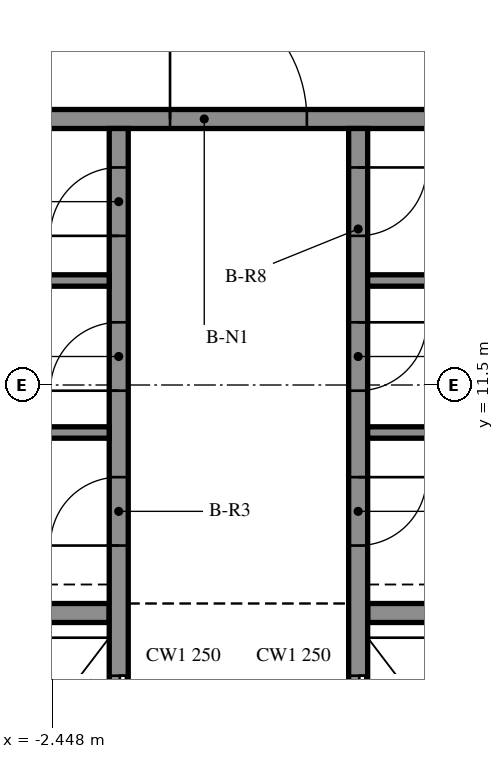
"""IFC4 building model, lengths in metres.
Left out: names, types, materials, properties, quantities, classifications, styles, units other than length and angle.
Written with IfcOpenShell. Run it as: python <this file> out.ifc"""

import sys

from ifc_helpers import new_model, si_unit, direction, frame, frame_2d, origin, place, context, subcontext, project, spatial, rectangle, extrude, element, fill, save


model = new_model("IFC4")
c1 = context("Model", 3, precision=1e-05, world=origin(), true_north=direction((0.0, 1.0)))
c2 = subcontext(c1, "Body", "Model", "MODEL_VIEW")
j1 = project(units=[si_unit("LENGTHUNIT", "METRE"), si_unit("PLANEANGLEUNIT", "RADIAN")], contexts=[c1])
p1 = place(None, origin())
s1 = spatial("IfcSite", under=j1, at=p1, CompositionType="ELEMENT")
p2 = place(p1, origin())
s2 = spatial("IfcBuilding", under=s1, at=p2, CompositionType="ELEMENT")
p3 = place(p2, frame((0.0, 0.0, 154.8)))
s3 = spatial("IfcBuildingStorey", under=s2, at=p3, CompositionType="ELEMENT", Elevation=154.8)
p4 = place(p3, frame((-4.55, 15.0, 0.0), z_axis=(0.0, 0.0, 1.0), x_axis=(1.0, 0.0, 0.0)))
e1 = element("IfcWall", 1, at=p4, inside=s3, PredefinedType="SOLIDWALL", context=c2, shape_type="SweptSolid", body=[
    extrude(rectangle(XDim=9.1, YDim=0.25, at=frame_2d((4.55, 0.0))), origin(), (0.0, 0.0, 1.0), 4.06),
])
p5 = place(p4, frame((3.65, 0.0, 0.0)))
e2 = element("IfcOpeningElement", 2, at=p5, cuts=e1, PredefinedType="OPENING", context=c2, shape_type="SweptSolid", body=[
    extrude(rectangle(XDim=1.8, YDim=2.1, at=frame_2d((0.9, 1.05))), frame((0.0, 0.135, 0.0), z_axis=(0.0, -1.0, 0.0), x_axis=(1.0, 0.0, 0.0)), (0.0, 0.0, 1.0), 0.27),
])
p6 = place(p3, frame((-1.575, -8.875, 0.0), z_axis=(0.0, 0.0, 1.0), x_axis=(0.0, 1.0, 0.0)))
e3 = element("IfcWall", 3, at=p6, inside=s3, PredefinedType="SOLIDWALL", context=c2, shape_type="SweptSolid", body=[
    extrude(rectangle(XDim=23.75, YDim=0.25, at=frame_2d((11.875, 0.0))), origin(), (0.0, 0.0, 1.0), 4.06),
])
p7 = place(p6, frame((7.2, 0.0, 0.0)))
e4 = element("IfcOpeningElement", 4, at=p7, cuts=e3, PredefinedType="OPENING", context=c2, shape_type="SweptSolid", body=[
    extrude(rectangle(XDim=1.1, YDim=2.1, at=frame_2d((0.55, 1.05))), frame((0.0, 0.135, 0.0), z_axis=(0.0, -1.0, 0.0), x_axis=(1.0, 0.0, 0.0)), (0.0, 0.0, 1.0), 0.27),
])
p8 = place(p6, frame((9.95, 0.0, 0.0)))
e5 = element("IfcOpeningElement", 5, at=p8, cuts=e3, PredefinedType="OPENING", context=c2, shape_type="SweptSolid", body=[
    extrude(rectangle(XDim=1.1, YDim=2.1, at=frame_2d((0.55, 1.05))), frame((0.0, 0.135, 0.0), z_axis=(0.0, -1.0, 0.0), x_axis=(1.0, 0.0, 0.0)), (0.0, 0.0, 1.0), 0.27),
])
p9 = place(p6, frame((12.7, 0.0, 0.0)))
e6 = element("IfcOpeningElement", 6, at=p9, cuts=e3, PredefinedType="OPENING", context=c2, shape_type="SweptSolid", body=[
    extrude(rectangle(XDim=1.1, YDim=2.1, at=frame_2d((0.55, 1.05))), frame((0.0, 0.135, 0.0), z_axis=(0.0, -1.0, 0.0), x_axis=(1.0, 0.0, 0.0)), (0.0, 0.0, 1.0), 0.27),
])
p10 = place(p6, frame((15.45, 0.0, 0.0)))
e7 = element("IfcOpeningElement", 7, at=p10, cuts=e3, PredefinedType="OPENING", context=c2, shape_type="SweptSolid", body=[
    extrude(rectangle(XDim=1.1, YDim=2.1, at=frame_2d((0.55, 1.05))), frame((0.0, 0.135, 0.0), z_axis=(0.0, -1.0, 0.0), x_axis=(1.0, 0.0, 0.0)), (0.0, 0.0, 1.0), 0.27),
])
p11 = place(p6, frame((1.012, 0.0, 0.0)))
e8 = element("IfcOpeningElement", 8, at=p11, cuts=e3, PredefinedType="OPENING", context=c2, shape_type="SweptSolid", body=[
    extrude(rectangle(XDim=0.9, YDim=2.1, at=frame_2d((0.45, 1.05))), frame((0.0, 0.135, 0.0), z_axis=(0.0, -1.0, 0.0), x_axis=(1.0, 0.0, 0.0)), (0.0, 0.0, 1.0), 0.27),
])
p12 = place(p6, frame((4.087, 0.0, 0.0)))
e9 = element("IfcOpeningElement", 9, at=p12, cuts=e3, PredefinedType="OPENING", context=c2, shape_type="SweptSolid", body=[
    extrude(rectangle(XDim=0.9, YDim=2.1, at=frame_2d((0.45, 1.05))), frame((0.0, 0.135, 0.0), z_axis=(0.0, -1.0, 0.0), x_axis=(1.0, 0.0, 0.0)), (0.0, 0.0, 1.0), 0.27),
])
p13 = place(p6, frame((18.262, 0.0, 0.0)))
e10 = element("IfcOpeningElement", 10, at=p13, cuts=e3, PredefinedType="OPENING", context=c2, shape_type="SweptSolid", body=[
    extrude(rectangle(XDim=0.9, YDim=2.1, at=frame_2d((0.45, 1.05))), frame((0.0, 0.135, 0.0), z_axis=(0.0, -1.0, 0.0), x_axis=(1.0, 0.0, 0.0)), (0.0, 0.0, 1.0), 0.27),
])
p14 = place(p6, frame((20.3, 0.0, 0.0)))
e11 = element("IfcOpeningElement", 11, at=p14, cuts=e3, PredefinedType="OPENING", context=c2, shape_type="SweptSolid", body=[
    extrude(rectangle(XDim=0.9, YDim=2.1, at=frame_2d((0.45, 1.05))), frame((0.0, 0.135, 0.0), z_axis=(0.0, -1.0, 0.0), x_axis=(1.0, 0.0, 0.0)), (0.0, 0.0, 1.0), 0.27),
])
p15 = place(p6, frame((22.337, 0.0, 0.0)))
e12 = element("IfcOpeningElement", 12, at=p15, cuts=e3, PredefinedType="OPENING", context=c2, shape_type="SweptSolid", body=[
    extrude(rectangle(XDim=0.9, YDim=2.1, at=frame_2d((0.45, 1.05))), frame((0.0, 0.135, 0.0), z_axis=(0.0, -1.0, 0.0), x_axis=(1.0, 0.0, 0.0)), (0.0, 0.0, 1.0), 0.27),
])
p16 = place(p3, frame((1.575, 14.875, 0.0), z_axis=(0.0, 0.0, 1.0), x_axis=(0.0, -1.0, 0.0)))
e13 = element("IfcWall", 13, at=p16, inside=s3, PredefinedType="SOLIDWALL", context=c2, shape_type="SweptSolid", body=[
    extrude(rectangle(XDim=17.5, YDim=0.25, at=frame_2d((8.75, 0.0))), origin(), (0.0, 0.0, 1.0), 4.06),
])
p17 = place(p16, frame((15.45, 0.0, 0.0)))
e14 = element("IfcOpeningElement", 14, at=p17, cuts=e13, PredefinedType="OPENING", context=c2, shape_type="SweptSolid", body=[
    extrude(rectangle(XDim=1.1, YDim=2.1, at=frame_2d((0.55, 1.05))), frame((0.0, 0.135, 0.0), z_axis=(0.0, -1.0, 0.0), x_axis=(1.0, 0.0, 0.0)), (0.0, 0.0, 1.0), 0.27),
])
p18 = place(p16, frame((12.7, 0.0, 0.0)))
e15 = element("IfcOpeningElement", 15, at=p18, cuts=e13, PredefinedType="OPENING", context=c2, shape_type="SweptSolid", body=[
    extrude(rectangle(XDim=1.1, YDim=2.1, at=frame_2d((0.55, 1.05))), frame((0.0, 0.135, 0.0), z_axis=(0.0, -1.0, 0.0), x_axis=(1.0, 0.0, 0.0)), (0.0, 0.0, 1.0), 0.27),
])
p19 = place(p16, frame((9.95, 0.0, 0.0)))
e16 = element("IfcOpeningElement", 16, at=p19, cuts=e13, PredefinedType="OPENING", context=c2, shape_type="SweptSolid", body=[
    extrude(rectangle(XDim=1.1, YDim=2.1, at=frame_2d((0.55, 1.05))), frame((0.0, 0.135, 0.0), z_axis=(0.0, -1.0, 0.0), x_axis=(1.0, 0.0, 0.0)), (0.0, 0.0, 1.0), 0.27),
])
p20 = place(p16, frame((7.2, 0.0, 0.0)))
e17 = element("IfcOpeningElement", 17, at=p20, cuts=e13, PredefinedType="OPENING", context=c2, shape_type="SweptSolid", body=[
    extrude(rectangle(XDim=1.1, YDim=2.1, at=frame_2d((0.55, 1.05))), frame((0.0, 0.135, 0.0), z_axis=(0.0, -1.0, 0.0), x_axis=(1.0, 0.0, 0.0)), (0.0, 0.0, 1.0), 0.27),
])
p21 = place(p16, frame((4.587, 0.0, 0.0)))
e18 = element("IfcOpeningElement", 18, at=p21, cuts=e13, PredefinedType="OPENING", context=c2, shape_type="SweptSolid", body=[
    extrude(rectangle(XDim=0.9, YDim=2.1, at=frame_2d((0.45, 1.05))), frame((0.0, 0.135, 0.0), z_axis=(0.0, -1.0, 0.0), x_axis=(1.0, 0.0, 0.0)), (0.0, 0.0, 1.0), 0.27),
])
p22 = place(p16, frame((2.55, 0.0, 0.0)))
e19 = element("IfcOpeningElement", 19, at=p22, cuts=e13, PredefinedType="OPENING", context=c2, shape_type="SweptSolid", body=[
    extrude(rectangle(XDim=0.9, YDim=2.1, at=frame_2d((0.45, 1.05))), frame((0.0, 0.135, 0.0), z_axis=(0.0, -1.0, 0.0), x_axis=(1.0, 0.0, 0.0)), (0.0, 0.0, 1.0), 0.27),
])
p23 = place(p16, frame((0.512, 0.0, 0.0)))
e20 = element("IfcOpeningElement", 20, at=p23, cuts=e13, PredefinedType="OPENING", context=c2, shape_type="SweptSolid", body=[
    extrude(rectangle(XDim=0.9, YDim=2.1, at=frame_2d((0.45, 1.05))), frame((0.0, 0.135, 0.0), z_axis=(0.0, -1.0, 0.0), x_axis=(1.0, 0.0, 0.0)), (0.0, 0.0, 1.0), 0.27),
])
for number, where, z_axis, x_axis in (
    (21, (-4.55, 8.5, 0.0), (0.0, 0.0, 1.0), (1.0, 0.0, 0.0)),
    (22, (1.7, 8.5, 0.0), (0.0, 0.0, 1.0), (1.0, 0.0, 0.0)),
):
    element("IfcWall", number, at=place(p3, frame(where, z_axis=z_axis, x_axis=x_axis)), inside=s3, PredefinedType="SOLIDWALL", context=c2, shape_type="SweptSolid", body=[
        extrude(rectangle(XDim=2.85, YDim=0.25, at=frame_2d((1.425, 0.0))), origin(), (0.0, 0.0, 1.0), 4.06),
    ])
for number, where, z_axis, x_axis in (
    (23, (-4.55, 10.875, 0.0), (0.0, 0.0, 1.0), (1.0, 0.0, 0.0)),
    (24, (-4.55, 12.875, 0.0), (0.0, 0.0, 1.0), (1.0, 0.0, 0.0)),
    (25, (1.7, 10.875, 0.0), (0.0, 0.0, 1.0), (1.0, 0.0, 0.0)),
    (26, (1.7, 12.875, 0.0), (0.0, 0.0, 1.0), (1.0, 0.0, 0.0)),
):
    element("IfcWall", number, at=place(p3, frame(where, z_axis=z_axis, x_axis=x_axis)), inside=s3, PredefinedType="PARTITIONING", context=c2, shape_type="SweptSolid", body=[
        extrude(rectangle(XDim=2.85, YDim=0.15, at=frame_2d((1.425, 0.0))), origin(), (0.0, 0.0, 1.0), 4.06),
    ])
p24 = place(p5, origin())
e27 = element("IfcDoor", 27, at=p24, inside=s3, OperationType="DOUBLE_DOOR_SINGLE_SWING", PredefinedType="DOOR", context=c2, shape_type="SweptSolid", body=[
    extrude(rectangle(XDim=1.8, YDim=2.1, at=frame_2d((0.9, 1.05))), frame((0.0, 0.025, 0.0), z_axis=(0.0, -1.0, 0.0), x_axis=(1.0, 0.0, 0.0)), (0.0, 0.0, 1.0), 0.05),
])
fill(e2, e27)
p25 = place(p20, origin())
e28 = element("IfcDoor", 28, at=p25, inside=s3, OperationType="DOUBLE_DOOR_SLIDING", PredefinedType="DOOR", context=c2, shape_type="SweptSolid", body=[
    extrude(rectangle(XDim=1.1, YDim=2.1, at=frame_2d((0.55, 1.05))), frame((0.0, 0.025, 0.0), z_axis=(0.0, -1.0, 0.0), x_axis=(1.0, 0.0, 0.0)), (0.0, 0.0, 1.0), 0.05),
])
fill(e17, e28)
p26 = place(p10, origin())
e29 = element("IfcDoor", 29, at=p26, inside=s3, OperationType="DOUBLE_DOOR_SLIDING", PredefinedType="DOOR", context=c2, shape_type="SweptSolid", body=[
    extrude(rectangle(XDim=1.1, YDim=2.1, at=frame_2d((0.55, 1.05))), frame((0.0, 0.025, 0.0), z_axis=(0.0, -1.0, 0.0), x_axis=(1.0, 0.0, 0.0)), (0.0, 0.0, 1.0), 0.05),
])
fill(e7, e29)
p27 = place(p13, origin())
e30 = element("IfcDoor", 30, at=p27, inside=s3, OperationType="SINGLE_SWING_LEFT", PredefinedType="DOOR", context=c2, shape_type="SweptSolid", body=[
    extrude(rectangle(XDim=0.9, YDim=2.1, at=frame_2d((0.45, 1.05))), frame((0.0, 0.025, 0.0), z_axis=(0.0, -1.0, 0.0), x_axis=(1.0, 0.0, 0.0)), (0.0, 0.0, 1.0), 0.05),
])
fill(e10, e30)
p28 = place(p14, origin())
e31 = element("IfcDoor", 31, at=p28, inside=s3, OperationType="SINGLE_SWING_RIGHT", PredefinedType="DOOR", context=c2, shape_type="SweptSolid", body=[
    extrude(rectangle(XDim=0.9, YDim=2.1, at=frame_2d((0.45, 1.05))), frame((0.0, 0.025, 0.0), z_axis=(0.0, -1.0, 0.0), x_axis=(1.0, 0.0, 0.0)), (0.0, 0.0, 1.0), 0.05),
])
fill(e11, e31)
p29 = place(p15, origin())
e32 = element("IfcDoor", 32, at=p29, inside=s3, OperationType="SINGLE_SWING_LEFT", PredefinedType="DOOR", context=c2, shape_type="SweptSolid", body=[
    extrude(rectangle(XDim=0.9, YDim=2.1, at=frame_2d((0.45, 1.05))), frame((0.0, 0.025, 0.0), z_axis=(0.0, -1.0, 0.0), x_axis=(1.0, 0.0, 0.0)), (0.0, 0.0, 1.0), 0.05),
])
fill(e12, e32)
p30 = place(p21, origin())
e33 = element("IfcDoor", 33, at=p30, inside=s3, OperationType="SINGLE_SWING_RIGHT", PredefinedType="DOOR", context=c2, shape_type="SweptSolid", body=[
    extrude(rectangle(XDim=0.9, YDim=2.1, at=frame_2d((0.45, 1.05))), frame((0.0, 0.025, 0.0), z_axis=(0.0, -1.0, 0.0), x_axis=(1.0, 0.0, 0.0)), (0.0, 0.0, 1.0), 0.05),
])
fill(e18, e33)
p31 = place(p22, origin())
e34 = element("IfcDoor", 34, at=p31, inside=s3, OperationType="SINGLE_SWING_LEFT", PredefinedType="DOOR", context=c2, shape_type="SweptSolid", body=[
    extrude(rectangle(XDim=0.9, YDim=2.1, at=frame_2d((0.45, 1.05))), frame((0.0, 0.025, 0.0), z_axis=(0.0, -1.0, 0.0), x_axis=(1.0, 0.0, 0.0)), (0.0, 0.0, 1.0), 0.05),
])
fill(e19, e34)
p32 = place(p23, origin())
e35 = element("IfcDoor", 35, at=p32, inside=s3, OperationType="SINGLE_SWING_RIGHT", PredefinedType="DOOR", context=c2, shape_type="SweptSolid", body=[
    extrude(rectangle(XDim=0.9, YDim=2.1, at=frame_2d((0.45, 1.05))), frame((0.0, 0.025, 0.0), z_axis=(0.0, -1.0, 0.0), x_axis=(1.0, 0.0, 0.0)), (0.0, 0.0, 1.0), 0.05),
])
fill(e20, e35)
save(model, sys.argv[1])
